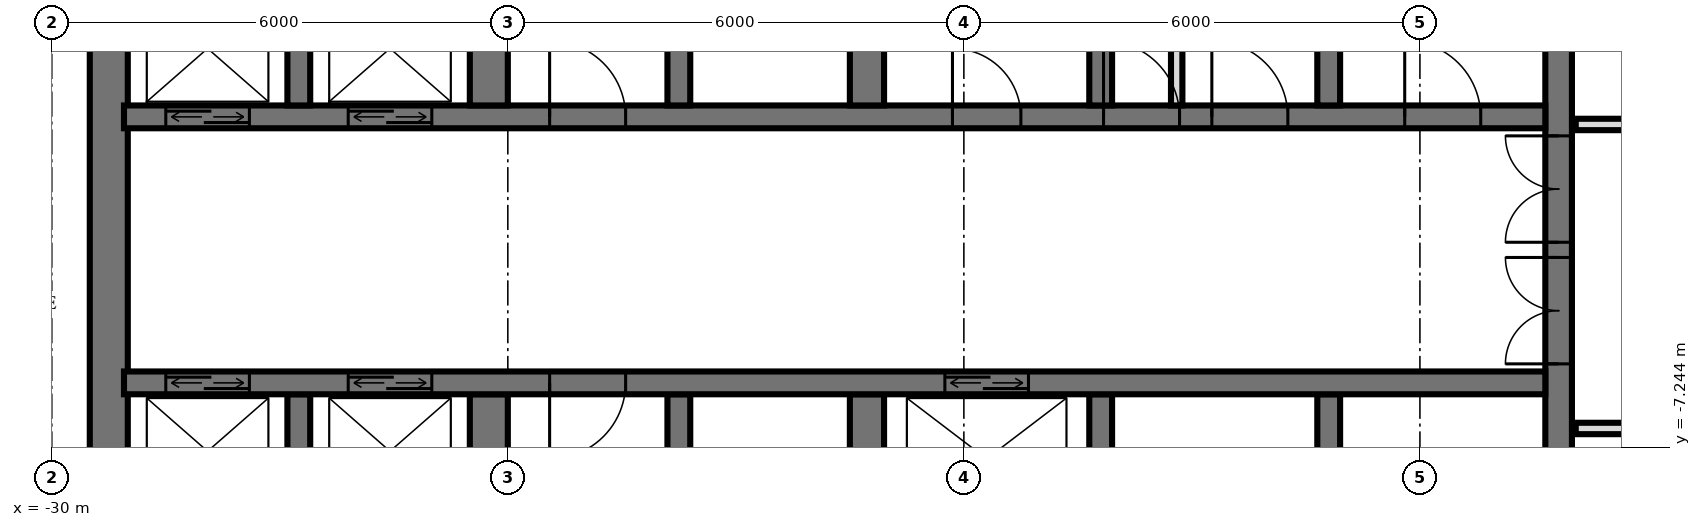
"""IFC4 building model, lengths in metres.
Left out: names, types, materials, properties, quantities, classifications, styles, units other than length and angle.
Written with IfcOpenShell. Run it as: python <this file> out.ifc"""

import sys

from ifc_helpers import new_model, si_unit, direction, frame, frame_2d, origin, place, context, subcontext, project, spatial, rectangle, extrude, element, fill, save


model = new_model("IFC4")
c1 = context("Model", 3, precision=1e-05, world=origin(), true_north=direction((0.0, 1.0)))
c2 = subcontext(c1, "Body", "Model", "MODEL_VIEW")
j1 = project(units=[si_unit("LENGTHUNIT", "METRE"), si_unit("PLANEANGLEUNIT", "RADIAN")], contexts=[c1])
p1 = place(None, origin())
s1 = spatial("IfcSite", under=j1, at=p1, CompositionType="ELEMENT")
p2 = place(p1, origin())
s2 = spatial("IfcBuilding", under=s1, at=p2, CompositionType="ELEMENT")
p3 = place(p2, frame((0.0, 0.0, 42.0)))
s3 = spatial("IfcBuildingStorey", under=s2, at=p3, CompositionType="ELEMENT", Elevation=42.0)
p4 = place(p3, frame((-10.175, -14.55, 0.0), z_axis=(0.0, 0.0, 1.0), x_axis=(0.0, 1.0, 0.0)))
e1 = element("IfcWall", 1, at=p4, inside=s3, PredefinedType="SHEAR", context=c2, shape_type="SweptSolid", body=[
    extrude(rectangle(XDim=14.1, YDim=0.35, at=frame_2d((7.05, 0.0))), origin(), (0.0, 0.0, 1.0), 3.6),
])
p5 = place(p4, frame((8.4, 0.0, 0.0)))
e2 = element("IfcOpeningElement", 2, at=p5, cuts=e1, PredefinedType="OPENING", context=c2, shape_type="SweptSolid", body=[
    extrude(rectangle(XDim=1.4, YDim=2.4, at=frame_2d((0.7, 1.2))), frame((0.0, 0.185, 0.0), z_axis=(0.0, -1.0, 0.0), x_axis=(1.0, 0.0, 0.0)), (0.0, 0.0, 1.0), 0.37),
])
p6 = place(p4, frame((10.0, 0.0, 0.0)))
e3 = element("IfcOpeningElement", 3, at=p6, cuts=e1, PredefinedType="OPENING", context=c2, shape_type="SweptSolid", body=[
    extrude(rectangle(XDim=1.4, YDim=2.4, at=frame_2d((0.7, 1.2))), frame((0.0, 0.185, 0.0), z_axis=(0.0, -1.0, 0.0), x_axis=(1.0, 0.0, 0.0)), (0.0, 0.0, 1.0), 0.37),
])
p7 = place(p4, frame((4.0, 0.0, 0.0)))
e4 = element("IfcOpeningElement", 4, at=p7, cuts=e1, PredefinedType="OPENING", context=c2, shape_type="SweptSolid", body=[
    extrude(rectangle(XDim=1.2, YDim=2.1, at=frame_2d((0.6, 1.05))), frame((0.0, 0.185, 0.0), z_axis=(0.0, -1.0, 0.0), x_axis=(1.0, 0.0, 0.0)), (0.0, 0.0, 1.0), 0.37),
])
p8 = place(p3, frame((-29.25, -14.55, 0.0), z_axis=(0.0, 0.0, 1.0), x_axis=(0.0, 1.0, 0.0)))
e5 = element("IfcWall", 5, at=p8, inside=s3, PredefinedType="SHEAR", context=c2, shape_type="SweptSolid", body=[
    extrude(rectangle(XDim=14.1, YDim=0.5, at=frame_2d((7.05, 0.0))), origin(), (0.0, 0.0, 1.0), 3.6),
])
p9 = place(p3, frame((-29.05, -2.9, 0.0), z_axis=(0.0, 0.0, 1.0), x_axis=(1.0, 0.0, 0.0)))
e6 = element("IfcWall", 6, at=p9, inside=s3, PredefinedType="SHEAR", context=c2, shape_type="SweptSolid", body=[
    extrude(rectangle(XDim=18.7, YDim=0.3, at=frame_2d((9.35, 0.0))), origin(), (0.0, 0.0, 1.0), 3.6),
])
p10 = place(p9, frame((2.95, 0.0, 0.0)))
e7 = element("IfcOpeningElement", 7, at=p10, cuts=e6, PredefinedType="OPENING", context=c2, shape_type="SweptSolid", body=[
    extrude(rectangle(XDim=1.1, YDim=2.1, at=frame_2d((0.55, 1.05))), frame((0.0, 0.16, 0.0), z_axis=(0.0, -1.0, 0.0), x_axis=(1.0, 0.0, 0.0)), (0.0, 0.0, 1.0), 0.32),
])
p11 = place(p9, frame((0.55, 0.0, 0.0)))
e8 = element("IfcOpeningElement", 8, at=p11, cuts=e6, PredefinedType="OPENING", context=c2, shape_type="SweptSolid", body=[
    extrude(rectangle(XDim=1.1, YDim=2.1, at=frame_2d((0.55, 1.05))), frame((0.0, 0.16, 0.0), z_axis=(0.0, -1.0, 0.0), x_axis=(1.0, 0.0, 0.0)), (0.0, 0.0, 1.0), 0.32),
])
p12 = place(p9, frame((10.9, 0.0, 0.0)))
e9 = element("IfcOpeningElement", 9, at=p12, cuts=e6, PredefinedType="OPENING", context=c2, shape_type="SweptSolid", body=[
    extrude(rectangle(XDim=0.9, YDim=2.1, at=frame_2d((0.45, 1.05))), frame((0.0, 0.16, 0.0), z_axis=(0.0, -1.0, 0.0), x_axis=(1.0, 0.0, 0.0)), (0.0, 0.0, 1.0), 0.32),
])
p13 = place(p9, frame((16.85, 0.0, 0.0)))
e10 = element("IfcOpeningElement", 10, at=p13, cuts=e6, PredefinedType="OPENING", context=c2, shape_type="SweptSolid", body=[
    extrude(rectangle(XDim=1.0, YDim=2.1, at=frame_2d((0.5, 1.05))), frame((0.0, 0.16, 0.0), z_axis=(0.0, -1.0, 0.0), x_axis=(1.0, 0.0, 0.0)), (0.0, 0.0, 1.0), 0.32),
])
p14 = place(p9, frame((14.312, 0.0, 0.0)))
e11 = element("IfcOpeningElement", 11, at=p14, cuts=e6, PredefinedType="OPENING", context=c2, shape_type="SweptSolid", body=[
    extrude(rectangle(XDim=1.0, YDim=2.1, at=frame_2d((0.5, 1.05))), frame((0.0, 0.16, 0.0), z_axis=(0.0, -1.0, 0.0), x_axis=(1.0, 0.0, 0.0)), (0.0, 0.0, 1.0), 0.32),
])
p15 = place(p9, frame((12.887, 0.0, 0.0)))
e12 = element("IfcOpeningElement", 12, at=p15, cuts=e6, PredefinedType="OPENING", context=c2, shape_type="SweptSolid", body=[
    extrude(rectangle(XDim=1.0, YDim=2.1, at=frame_2d((0.5, 1.05))), frame((0.0, 0.16, 0.0), z_axis=(0.0, -1.0, 0.0), x_axis=(1.0, 0.0, 0.0)), (0.0, 0.0, 1.0), 0.32),
])
p16 = place(p9, frame((5.6, 0.0, 0.0)))
e13 = element("IfcOpeningElement", 13, at=p16, cuts=e6, PredefinedType="OPENING", context=c2, shape_type="SweptSolid", body=[
    extrude(rectangle(XDim=1.0, YDim=2.1, at=frame_2d((0.5, 1.05))), frame((0.0, 0.16, 0.0), z_axis=(0.0, -1.0, 0.0), x_axis=(1.0, 0.0, 0.0)), (0.0, 0.0, 1.0), 0.32),
])
p17 = place(p3, frame((-29.05, -6.4, 0.0), z_axis=(0.0, 0.0, 1.0), x_axis=(1.0, 0.0, 0.0)))
e14 = element("IfcWall", 14, at=p17, inside=s3, PredefinedType="SHEAR", context=c2, shape_type="SweptSolid", body=[
    extrude(rectangle(XDim=18.7, YDim=0.3, at=frame_2d((9.35, 0.0))), origin(), (0.0, 0.0, 1.0), 3.6),
])
p18 = place(p17, frame((2.95, 0.0, 0.0)))
e15 = element("IfcOpeningElement", 15, at=p18, cuts=e14, PredefinedType="OPENING", context=c2, shape_type="SweptSolid", body=[
    extrude(rectangle(XDim=1.1, YDim=2.1, at=frame_2d((0.55, 1.05))), frame((0.0, 0.16, 0.0), z_axis=(0.0, -1.0, 0.0), x_axis=(1.0, 0.0, 0.0)), (0.0, 0.0, 1.0), 0.32),
])
p19 = place(p17, frame((0.55, 0.0, 0.0)))
e16 = element("IfcOpeningElement", 16, at=p19, cuts=e14, PredefinedType="OPENING", context=c2, shape_type="SweptSolid", body=[
    extrude(rectangle(XDim=1.1, YDim=2.1, at=frame_2d((0.55, 1.05))), frame((0.0, 0.16, 0.0), z_axis=(0.0, -1.0, 0.0), x_axis=(1.0, 0.0, 0.0)), (0.0, 0.0, 1.0), 0.32),
])
p20 = place(p17, frame((10.8, 0.0, 0.0)))
e17 = element("IfcOpeningElement", 17, at=p20, cuts=e14, PredefinedType="OPENING", context=c2, shape_type="SweptSolid", body=[
    extrude(rectangle(XDim=1.1, YDim=2.1, at=frame_2d((0.55, 1.05))), frame((0.0, 0.16, 0.0), z_axis=(0.0, -1.0, 0.0), x_axis=(1.0, 0.0, 0.0)), (0.0, 0.0, 1.0), 0.32),
])
p21 = place(p17, frame((5.6, 0.0, 0.0)))
e18 = element("IfcOpeningElement", 18, at=p21, cuts=e14, PredefinedType="OPENING", context=c2, shape_type="SweptSolid", body=[
    extrude(rectangle(XDim=1.0, YDim=2.1, at=frame_2d((0.5, 1.05))), frame((0.0, 0.16, 0.0), z_axis=(0.0, -1.0, 0.0), x_axis=(1.0, 0.0, 0.0)), (0.0, 0.0, 1.0), 0.32),
])
for number, where, z_axis, x_axis in (
    (19, (-13.2, -2.75, 0.0), (0.0, 0.0, 1.0), (0.0, 1.0, 0.0)),
    (20, (-13.2, -8.85, 0.0), (0.0, 0.0, 1.0), (0.0, 1.0, 0.0)),
    (21, (-16.2, -2.75, 0.0), (0.0, 0.0, 1.0), (0.0, 1.0, 0.0)),
    (22, (-16.2, -8.85, 0.0), (0.0, 0.0, 1.0), (0.0, 1.0, 0.0)),
):
    element("IfcWall", number, at=place(p3, frame(where, z_axis=z_axis, x_axis=x_axis)), inside=s3, PredefinedType="SHEAR", context=c2, shape_type="SweptSolid", body=[
        extrude(rectangle(XDim=2.3, YDim=0.3, at=frame_2d((1.15, 0.0))), origin(), (0.0, 0.0, 1.0), 3.6),
    ])
for number, where, z_axis, x_axis in (
    (23, (-19.275, -2.75, 0.0), (0.0, 0.0, 1.0), (0.0, 1.0, 0.0)),
    (24, (-19.275, -8.85, 0.0), (0.0, 0.0, 1.0), (0.0, 1.0, 0.0)),
):
    element("IfcWall", number, at=place(p3, frame(where, z_axis=z_axis, x_axis=x_axis)), inside=s3, PredefinedType="SHEAR", context=c2, shape_type="SweptSolid", body=[
        extrude(rectangle(XDim=2.3, YDim=0.45, at=frame_2d((1.15, 0.0))), origin(), (0.0, 0.0, 1.0), 3.6),
    ])
for number, where, z_axis, x_axis in (
    (25, (-21.75, -2.75, 0.0), (0.0, 0.0, 1.0), (0.0, 1.0, 0.0)),
    (26, (-21.75, -8.85, 0.0), (0.0, 0.0, 1.0), (0.0, 1.0, 0.0)),
):
    element("IfcWall", number, at=place(p3, frame(where, z_axis=z_axis, x_axis=x_axis)), inside=s3, PredefinedType="SHEAR", context=c2, shape_type="SweptSolid", body=[
        extrude(rectangle(XDim=2.3, YDim=0.3, at=frame_2d((1.15, 0.0))), origin(), (0.0, 0.0, 1.0), 3.6),
    ])
for number, where, z_axis, x_axis in (
    (27, (-24.25, -2.75, 0.0), (0.0, 0.0, 1.0), (0.0, 1.0, 0.0)),
    (28, (-24.25, -8.85, 0.0), (0.0, 0.0, 1.0), (0.0, 1.0, 0.0)),
):
    element("IfcWall", number, at=place(p3, frame(where, z_axis=z_axis, x_axis=x_axis)), inside=s3, PredefinedType="SHEAR", context=c2, shape_type="SweptSolid", body=[
        extrude(rectangle(XDim=2.3, YDim=0.5, at=frame_2d((1.15, 0.0))), origin(), (0.0, 0.0, 1.0), 3.6),
    ])
for number, where, z_axis, x_axis in (
    (29, (-26.75, -2.75, 0.0), (0.0, 0.0, 1.0), (0.0, 1.0, 0.0)),
    (30, (-26.75, -8.85, 0.0), (0.0, 0.0, 1.0), (0.0, 1.0, 0.0)),
):
    element("IfcWall", number, at=place(p3, frame(where, z_axis=z_axis, x_axis=x_axis)), inside=s3, PredefinedType="SHEAR", context=c2, shape_type="SweptSolid", body=[
        extrude(rectangle(XDim=2.3, YDim=0.3, at=frame_2d((1.15, 0.0))), origin(), (0.0, 0.0, 1.0), 3.6),
    ])
p22 = place(p3, frame((-15.2, -2.75, 0.0), z_axis=(0.0, 0.0, 1.0), x_axis=(0.0, 1.0, 0.0)))
e31 = element("IfcWall", 31, at=p22, inside=s3, PredefinedType="PARTITIONING", context=c2, shape_type="SweptSolid", body=[
    extrude(rectangle(XDim=2.3, YDim=0.15, at=frame_2d((1.15, 0.0))), origin(), (0.0, 0.0, 1.0), 3.3),
])
p23 = place(p3, frame((-9.95, -7.0, 0.0), z_axis=(0.0, 0.0, 1.0), x_axis=(1.0, 0.0, 0.0)))
e32 = element("IfcWall", 32, at=p23, inside=s3, PredefinedType="PARTITIONING", context=c2, shape_type="SweptSolid", body=[
    extrude(rectangle(XDim=19.9, YDim=0.15, at=frame_2d((9.95, 0.0))), origin(), (0.0, 0.0, 1.0), 3.32),
])
p24 = place(p23, frame((9.45, 0.0, 0.0)))
e33 = element("IfcOpeningElement", 33, at=p24, cuts=e32, PredefinedType="OPENING", context=c2, shape_type="SweptSolid", body=[
    extrude(rectangle(XDim=1.0, YDim=2.1, at=frame_2d((0.5, 1.05))), frame((0.0, 0.085, 0.0), z_axis=(0.0, -1.0, 0.0), x_axis=(1.0, 0.0, 0.0)), (0.0, 0.0, 1.0), 0.17),
])
p25 = place(p23, frame((15.45, 0.0, 0.0)))
e34 = element("IfcOpeningElement", 34, at=p25, cuts=e32, PredefinedType="OPENING", context=c2, shape_type="SweptSolid", body=[
    extrude(rectangle(XDim=1.0, YDim=2.1, at=frame_2d((0.5, 1.05))), frame((0.0, 0.085, 0.0), z_axis=(0.0, -1.0, 0.0), x_axis=(1.0, 0.0, 0.0)), (0.0, 0.0, 1.0), 0.17),
])
p26 = place(p3, frame((-9.95, -3.0, 0.0), z_axis=(0.0, 0.0, 1.0), x_axis=(1.0, 0.0, 0.0)))
e35 = element("IfcWall", 35, at=p26, inside=s3, PredefinedType="PARTITIONING", context=c2, shape_type="SweptSolid", body=[
    extrude(rectangle(XDim=19.9, YDim=0.15, at=frame_2d((9.95, 0.0))), origin(), (0.0, 0.0, 1.0), 3.32),
])
p27 = place(p26, frame((1.7, 0.0, 0.0)))
e36 = element("IfcOpeningElement", 36, at=p27, cuts=e35, PredefinedType="OPENING", context=c2, shape_type="SweptSolid", body=[
    extrude(rectangle(XDim=1.0, YDim=2.1, at=frame_2d((0.5, 1.05))), frame((0.0, 0.085, 0.0), z_axis=(0.0, -1.0, 0.0), x_axis=(1.0, 0.0, 0.0)), (0.0, 0.0, 1.0), 0.17),
])
p28 = place(p26, frame((5.45, 0.0, 0.0)))
e37 = element("IfcOpeningElement", 37, at=p28, cuts=e35, PredefinedType="OPENING", context=c2, shape_type="SweptSolid", body=[
    extrude(rectangle(XDim=1.0, YDim=2.1, at=frame_2d((0.5, 1.05))), frame((0.0, 0.085, 0.0), z_axis=(0.0, -1.0, 0.0), x_axis=(1.0, 0.0, 0.0)), (0.0, 0.0, 1.0), 0.17),
])
p29 = place(p26, frame((8.2, 0.0, 0.0)))
e38 = element("IfcOpeningElement", 38, at=p29, cuts=e35, PredefinedType="OPENING", context=c2, shape_type="SweptSolid", body=[
    extrude(rectangle(XDim=1.0, YDim=2.1, at=frame_2d((0.5, 1.05))), frame((0.0, 0.085, 0.0), z_axis=(0.0, -1.0, 0.0), x_axis=(1.0, 0.0, 0.0)), (0.0, 0.0, 1.0), 0.17),
])
p30 = place(p26, frame((11.95, 0.0, 0.0)))
e39 = element("IfcOpeningElement", 39, at=p30, cuts=e35, PredefinedType="OPENING", context=c2, shape_type="SweptSolid", body=[
    extrude(rectangle(XDim=1.0, YDim=2.1, at=frame_2d((0.5, 1.05))), frame((0.0, 0.085, 0.0), z_axis=(0.0, -1.0, 0.0), x_axis=(1.0, 0.0, 0.0)), (0.0, 0.0, 1.0), 0.17),
])
p31 = place(p26, frame((16.95, 0.0, 0.0)))
e40 = element("IfcOpeningElement", 40, at=p31, cuts=e35, PredefinedType="OPENING", context=c2, shape_type="SweptSolid", body=[
    extrude(rectangle(XDim=1.0, YDim=2.1, at=frame_2d((0.5, 1.05))), frame((0.0, 0.085, 0.0), z_axis=(0.0, -1.0, 0.0), x_axis=(1.0, 0.0, 0.0)), (0.0, 0.0, 1.0), 0.17),
])
p32 = place(p10, origin())
e41 = element("IfcDoor", 41, at=p32, inside=s3, OperationType="DOUBLE_DOOR_SLIDING", PredefinedType="USERDEFINED", context=c2, shape_type="SweptSolid", body=[
    extrude(rectangle(XDim=1.1, YDim=2.1, at=frame_2d((0.55, 1.05))), frame((0.0, 0.025, 0.0), z_axis=(0.0, -1.0, 0.0), x_axis=(1.0, 0.0, 0.0)), (0.0, 0.0, 1.0), 0.05),
])
fill(e7, e41)
p33 = place(p11, origin())
e42 = element("IfcDoor", 42, at=p33, inside=s3, OperationType="DOUBLE_DOOR_SLIDING", PredefinedType="USERDEFINED", context=c2, shape_type="SweptSolid", body=[
    extrude(rectangle(XDim=1.1, YDim=2.1, at=frame_2d((0.55, 1.05))), frame((0.0, 0.025, 0.0), z_axis=(0.0, -1.0, 0.0), x_axis=(1.0, 0.0, 0.0)), (0.0, 0.0, 1.0), 0.05),
])
fill(e8, e42)
p34 = place(p18, origin())
e43 = element("IfcDoor", 43, at=p34, inside=s3, OperationType="DOUBLE_DOOR_SLIDING", PredefinedType="USERDEFINED", context=c2, shape_type="SweptSolid", body=[
    extrude(rectangle(XDim=1.1, YDim=2.1, at=frame_2d((0.55, 1.05))), frame((0.0, 0.025, 0.0), z_axis=(0.0, -1.0, 0.0), x_axis=(1.0, 0.0, 0.0)), (0.0, 0.0, 1.0), 0.05),
])
fill(e15, e43)
p35 = place(p19, origin())
e44 = element("IfcDoor", 44, at=p35, inside=s3, OperationType="DOUBLE_DOOR_SLIDING", PredefinedType="USERDEFINED", context=c2, shape_type="SweptSolid", body=[
    extrude(rectangle(XDim=1.1, YDim=2.1, at=frame_2d((0.55, 1.05))), frame((0.0, 0.025, 0.0), z_axis=(0.0, -1.0, 0.0), x_axis=(1.0, 0.0, 0.0)), (0.0, 0.0, 1.0), 0.05),
])
fill(e16, e44)
p36 = place(p20, origin())
e45 = element("IfcDoor", 45, at=p36, inside=s3, OperationType="DOUBLE_DOOR_SLIDING", PredefinedType="USERDEFINED", context=c2, shape_type="SweptSolid", body=[
    extrude(rectangle(XDim=1.1, YDim=2.1, at=frame_2d((0.55, 1.05))), frame((0.0, 0.025, 0.0), z_axis=(0.0, -1.0, 0.0), x_axis=(1.0, 0.0, 0.0)), (0.0, 0.0, 1.0), 0.05),
])
fill(e17, e45)
p37 = place(p5, origin())
e46 = element("IfcDoor", 46, at=p37, inside=s3, OperationType="DOUBLE_DOOR_SINGLE_SWING", PredefinedType="DOOR", context=c2, shape_type="SweptSolid", body=[
    extrude(rectangle(XDim=1.4, YDim=2.4, at=frame_2d((0.7, 1.2))), frame((0.0, 0.025, 0.0), z_axis=(0.0, -1.0, 0.0), x_axis=(1.0, 0.0, 0.0)), (0.0, 0.0, 1.0), 0.05),
])
fill(e2, e46)
p38 = place(p6, origin())
e47 = element("IfcDoor", 47, at=p38, inside=s3, OperationType="DOUBLE_DOOR_SINGLE_SWING", PredefinedType="DOOR", context=c2, shape_type="SweptSolid", body=[
    extrude(rectangle(XDim=1.4, YDim=2.4, at=frame_2d((0.7, 1.2))), frame((0.0, 0.025, 0.0), z_axis=(0.0, -1.0, 0.0), x_axis=(1.0, 0.0, 0.0)), (0.0, 0.0, 1.0), 0.05),
])
fill(e3, e47)
p39 = place(p12, origin())
e48 = element("IfcDoor", 48, at=p39, inside=s3, OperationType="SINGLE_SWING_RIGHT", PredefinedType="DOOR", context=c2, shape_type="SweptSolid", body=[
    extrude(rectangle(XDim=0.9, YDim=2.1, at=frame_2d((0.45, 1.05))), frame((0.0, 0.025, 0.0), z_axis=(0.0, -1.0, 0.0), x_axis=(1.0, 0.0, 0.0)), (0.0, 0.0, 1.0), 0.05),
])
fill(e9, e48)
p40 = place(p13, origin())
e49 = element("IfcDoor", 49, at=p40, inside=s3, OperationType="SINGLE_SWING_RIGHT", PredefinedType="DOOR", context=c2, shape_type="SweptSolid", body=[
    extrude(rectangle(XDim=1.0, YDim=2.1, at=frame_2d((0.5, 1.05))), frame((0.0, 0.025, 0.0), z_axis=(0.0, -1.0, 0.0), x_axis=(1.0, 0.0, 0.0)), (0.0, 0.0, 1.0), 0.05),
])
fill(e10, e49)
p41 = place(p14, origin())
e50 = element("IfcDoor", 50, at=p41, inside=s3, OperationType="SINGLE_SWING_RIGHT", PredefinedType="DOOR", context=c2, shape_type="SweptSolid", body=[
    extrude(rectangle(XDim=1.0, YDim=2.1, at=frame_2d((0.5, 1.05))), frame((0.0, 0.025, 0.0), z_axis=(0.0, -1.0, 0.0), x_axis=(1.0, 0.0, 0.0)), (0.0, 0.0, 1.0), 0.05),
])
fill(e11, e50)
p42 = place(p15, origin())
e51 = element("IfcDoor", 51, at=p42, inside=s3, OperationType="SINGLE_SWING_RIGHT", PredefinedType="DOOR", context=c2, shape_type="SweptSolid", body=[
    extrude(rectangle(XDim=1.0, YDim=2.1, at=frame_2d((0.5, 1.05))), frame((0.0, 0.025, 0.0), z_axis=(0.0, -1.0, 0.0), x_axis=(1.0, 0.0, 0.0)), (0.0, 0.0, 1.0), 0.05),
])
fill(e12, e51)
p43 = place(p16, origin())
e52 = element("IfcDoor", 52, at=p43, inside=s3, OperationType="SINGLE_SWING_RIGHT", PredefinedType="DOOR", context=c2, shape_type="SweptSolid", body=[
    extrude(rectangle(XDim=1.0, YDim=2.1, at=frame_2d((0.5, 1.05))), frame((0.0, 0.025, 0.0), z_axis=(0.0, -1.0, 0.0), x_axis=(1.0, 0.0, 0.0)), (0.0, 0.0, 1.0), 0.05),
])
fill(e13, e52)
p44 = place(p21, frame((0.5, 0.0, 0.0), z_axis=(0.0, 0.0, 1.0), x_axis=(-1.0, 0.0, 0.0)))
e53 = element("IfcDoor", 53, at=p44, inside=s3, OperationType="SINGLE_SWING_LEFT", PredefinedType="DOOR", context=c2, shape_type="SweptSolid", body=[
    extrude(rectangle(XDim=1.0, YDim=2.1, at=frame_2d((0.0, 1.05))), frame((0.0, -0.025, 0.0), z_axis=(0.0, 1.0, 0.0), x_axis=(-1.0, 0.0, 0.0)), (0.0, 0.0, 1.0), 0.05),
])
fill(e18, e53)
save(model, sys.argv[1])
